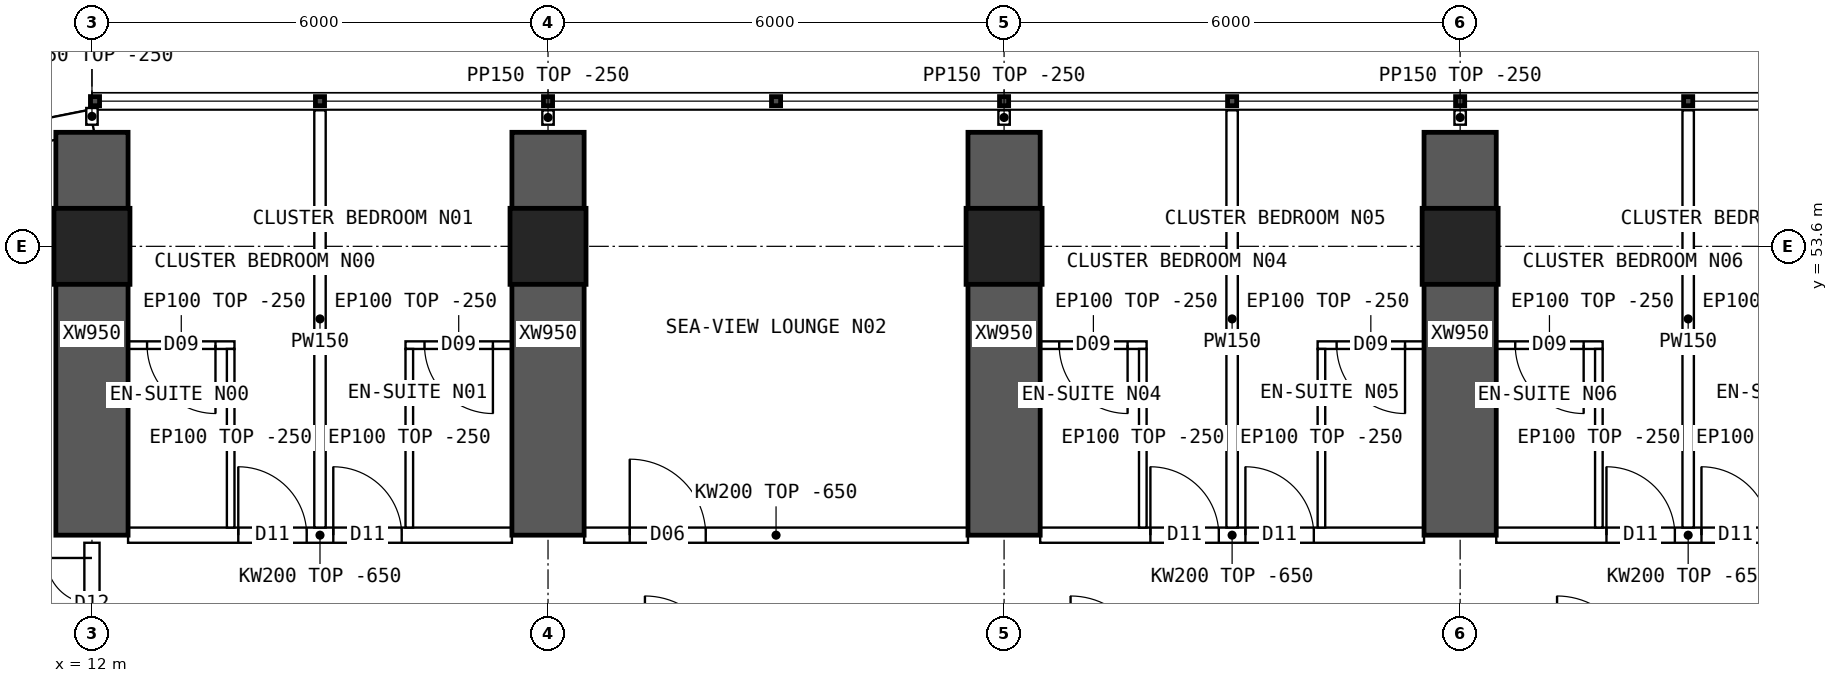
"""IFC4 building model, lengths in metres.
Left out: names, types, materials, properties, quantities, classifications, styles, units other than length and angle.
Written with IfcOpenShell. Run it as: python <this file> out.ifc"""

import sys

from ifc_helpers import new_model, si_unit, direction, frame, frame_2d, origin, origin_2d, place, context, subcontext, project, spatial, polyline, rectangle, hollow_rectangle, outline, extrude, element, fill, save


model = new_model("IFC4")
c1 = context("Model", 3, precision=1e-05, world=origin(), true_north=direction((0.0, 1.0)))
c2 = subcontext(c1, "Body", "Model", "MODEL_VIEW")
j1 = project(units=[si_unit("LENGTHUNIT", "METRE"), si_unit("PLANEANGLEUNIT", "RADIAN")], contexts=[c1])
p1 = place(None, origin())
s1 = spatial("IfcSite", under=j1, at=p1, CompositionType="ELEMENT")
p2 = place(p1, origin())
s2 = spatial("IfcBuilding", under=s1, at=p2, CompositionType="ELEMENT")
p3 = place(p2, frame((0.0, 0.0, 84.4)))
s3 = spatial("IfcBuildingStorey", under=s2, at=p3, CompositionType="ELEMENT", Elevation=84.4)
for number, where, z_axis, x_axis in (
    (1, (12.0, 53.6, 0.0), (0.0, 0.0, 1.0), (1.0, 0.0, 0.0)),
    (2, (18.0, 53.6, 0.0), (0.0, 0.0, 1.0), (1.0, 0.0, 0.0)),
    (3, (24.0, 53.6, 0.0), (0.0, 0.0, 1.0), (1.0, 0.0, 0.0)),
    (4, (30.0, 53.6, 0.0), (0.0, 0.0, 1.0), (1.0, 0.0, 0.0)),
):
    element("IfcColumn", number, at=place(p3, frame(where, z_axis=z_axis, x_axis=x_axis)), inside=s3, PredefinedType="COLUMN", context=c2, shape_type="SweptSolid", body=[
        extrude(hollow_rectangle(XDim=1.0, YDim=1.0, WallThickness=0.1, at=origin_2d()), origin(), (0.0, 0.0, 1.0), 3.75),
    ])
for number, where, z_axis, x_axis in (
    (5, (12.0, 49.8, 0.0), (0.0, 0.0, 1.0), (0.0, 1.0, 0.0)),
    (6, (18.0, 49.8, 0.0), (0.0, 0.0, 1.0), (0.0, 1.0, 0.0)),
    (7, (24.0, 49.8, 0.0), (0.0, 0.0, 1.0), (0.0, 1.0, 0.0)),
    (8, (30.0, 49.8, 0.0), (0.0, 0.0, 1.0), (0.0, 1.0, 0.0)),
):
    element("IfcWall", number, at=place(p3, frame(where, z_axis=z_axis, x_axis=x_axis)), inside=s3, PredefinedType="SHEAR", context=c2, shape_type="SweptSolid", body=[
        extrude(rectangle(XDim=5.3, YDim=0.95, at=frame_2d((2.65, 0.0))), origin(), (0.0, 0.0, 1.0), 3.75),
    ])
p4 = place(p3, frame((12.0, 55.25, 0.0), z_axis=(0.0, 0.0, 1.0), x_axis=(-0.980787251524, -0.195080412259, 0.0)))
e9 = element("IfcWall", 9, at=p4, inside=s3, PredefinedType="SOLIDWALL", context=c2, shape_type="SweptSolid", body=[
    extrude(outline(polyline([(-0.03, -0.15), (3.249, -0.15), (3.189, 0.15), (0.03, 0.15), (-0.03, -0.15)])), origin(), (0.0, 0.0, 1.0), 3.5),
])
p5 = place(p4, frame((0.909, 0.0, 0.9)))
e10 = element("IfcOpeningElement", 10, at=p5, cuts=e9, PredefinedType="OPENING", context=c2, shape_type="SweptSolid", body=[
    extrude(rectangle(XDim=1.4, YDim=1.8, at=frame_2d((0.7, 0.9))), frame((0.0, 0.16, 0.0), z_axis=(0.0, -1.0, 0.0), x_axis=(1.0, 0.0, 0.0)), (0.0, 0.0, 1.0), 0.32),
])
p6 = place(p3, frame((12.475, 49.8, 0.0), z_axis=(0.0, 0.0, 1.0), x_axis=(1.0, 0.0, 0.0)))
e11 = element("IfcWall", 11, at=p6, inside=s3, PredefinedType="SOLIDWALL", context=c2, shape_type="SweptSolid", body=[
    extrude(outline(polyline([(0.0, 0.0), (5.05, 0.0), (5.05, 3.1), (0.0, 3.1), (0.0, 0.0)])), frame((0.0, 0.1, 0.0), z_axis=(0.0, -1.0, 0.0), x_axis=(1.0, 0.0, 0.0)), (0.0, 0.0, 1.0), 0.2),
])
p7 = place(p6, frame((1.45, 0.0, 0.0)))
e12 = element("IfcOpeningElement", 12, at=p7, cuts=e11, PredefinedType="OPENING", context=c2, shape_type="SweptSolid", body=[
    extrude(rectangle(XDim=0.9, YDim=2.1, at=frame_2d((0.45, 1.05))), frame((0.0, 0.11, 0.0), z_axis=(0.0, -1.0, 0.0), x_axis=(1.0, 0.0, 0.0)), (0.0, 0.0, 1.0), 0.22),
])
p8 = place(p6, frame((2.7, 0.0, 0.0)))
e13 = element("IfcOpeningElement", 13, at=p8, cuts=e11, PredefinedType="OPENING", context=c2, shape_type="SweptSolid", body=[
    extrude(rectangle(XDim=0.9, YDim=2.1, at=frame_2d((0.45, 1.05))), frame((0.0, 0.11, 0.0), z_axis=(0.0, -1.0, 0.0), x_axis=(1.0, 0.0, 0.0)), (0.0, 0.0, 1.0), 0.22),
])
p9 = place(p3, frame((18.475, 49.8, 0.0), z_axis=(0.0, 0.0, 1.0), x_axis=(1.0, 0.0, 0.0)))
e14 = element("IfcWall", 14, at=p9, inside=s3, PredefinedType="SOLIDWALL", context=c2, shape_type="SweptSolid", body=[
    extrude(outline(polyline([(0.0, 0.0), (5.05, 0.0), (5.05, 3.1), (0.0, 3.1), (0.0, 0.0)])), frame((0.0, 0.1, 0.0), z_axis=(0.0, -1.0, 0.0), x_axis=(1.0, 0.0, 0.0)), (0.0, 0.0, 1.0), 0.2),
])
p10 = place(p9, frame((0.6, 0.0, 0.0)))
e15 = element("IfcOpeningElement", 15, at=p10, cuts=e14, PredefinedType="OPENING", context=c2, shape_type="SweptSolid", body=[
    extrude(rectangle(XDim=1.0, YDim=2.1, at=frame_2d((0.5, 1.05))), frame((0.0, 0.11, 0.0), z_axis=(0.0, -1.0, 0.0), x_axis=(1.0, 0.0, 0.0)), (0.0, 0.0, 1.0), 0.22),
])
p11 = place(p3, frame((24.475, 49.8, 0.0), z_axis=(0.0, 0.0, 1.0), x_axis=(1.0, 0.0, 0.0)))
e16 = element("IfcWall", 16, at=p11, inside=s3, PredefinedType="SOLIDWALL", context=c2, shape_type="SweptSolid", body=[
    extrude(outline(polyline([(0.0, 0.0), (5.05, 0.0), (5.05, 3.1), (0.0, 3.1), (0.0, 0.0)])), frame((0.0, 0.1, 0.0), z_axis=(0.0, -1.0, 0.0), x_axis=(1.0, 0.0, 0.0)), (0.0, 0.0, 1.0), 0.2),
])
p12 = place(p11, frame((1.45, 0.0, 0.0)))
e17 = element("IfcOpeningElement", 17, at=p12, cuts=e16, PredefinedType="OPENING", context=c2, shape_type="SweptSolid", body=[
    extrude(rectangle(XDim=0.9, YDim=2.1, at=frame_2d((0.45, 1.05))), frame((0.0, 0.11, 0.0), z_axis=(0.0, -1.0, 0.0), x_axis=(1.0, 0.0, 0.0)), (0.0, 0.0, 1.0), 0.22),
])
p13 = place(p11, frame((2.7, 0.0, 0.0)))
e18 = element("IfcOpeningElement", 18, at=p13, cuts=e16, PredefinedType="OPENING", context=c2, shape_type="SweptSolid", body=[
    extrude(rectangle(XDim=0.9, YDim=2.1, at=frame_2d((0.45, 1.05))), frame((0.0, 0.11, 0.0), z_axis=(0.0, -1.0, 0.0), x_axis=(1.0, 0.0, 0.0)), (0.0, 0.0, 1.0), 0.22),
])
p14 = place(p3, frame((30.475, 49.8, 0.0), z_axis=(0.0, 0.0, 1.0), x_axis=(1.0, 0.0, 0.0)))
e19 = element("IfcWall", 19, at=p14, inside=s3, PredefinedType="SOLIDWALL", context=c2, shape_type="SweptSolid", body=[
    extrude(outline(polyline([(0.0, 0.0), (5.05, 0.0), (5.05, 3.1), (0.0, 3.1), (0.0, 0.0)])), frame((0.0, 0.1, 0.0), z_axis=(0.0, -1.0, 0.0), x_axis=(1.0, 0.0, 0.0)), (0.0, 0.0, 1.0), 0.2),
])
p15 = place(p14, frame((1.45, 0.0, 0.0)))
e20 = element("IfcOpeningElement", 20, at=p15, cuts=e19, PredefinedType="OPENING", context=c2, shape_type="SweptSolid", body=[
    extrude(rectangle(XDim=0.9, YDim=2.1, at=frame_2d((0.45, 1.05))), frame((0.0, 0.11, 0.0), z_axis=(0.0, -1.0, 0.0), x_axis=(1.0, 0.0, 0.0)), (0.0, 0.0, 1.0), 0.22),
])
p16 = place(p14, frame((2.7, 0.0, 0.0)))
e21 = element("IfcOpeningElement", 21, at=p16, cuts=e19, PredefinedType="OPENING", context=c2, shape_type="SweptSolid", body=[
    extrude(rectangle(XDim=0.9, YDim=2.1, at=frame_2d((0.45, 1.05))), frame((0.0, 0.11, 0.0), z_axis=(0.0, -1.0, 0.0), x_axis=(1.0, 0.0, 0.0)), (0.0, 0.0, 1.0), 0.22),
])
p17 = place(p3, frame((15.0, 55.39, 0.0), z_axis=(0.0, 0.0, 1.0), x_axis=(0.0, -1.0, 0.0)))
e22 = element("IfcWall", 22, at=p17, inside=s3, PredefinedType="PARTITIONING", context=c2, shape_type="SweptSolid", body=[
    extrude(outline(polyline([(0.0, 0.0), (5.49, 0.0), (5.49, 3.1), (5.442, 3.1), (5.44, 3.5), (1.992, 3.5), (1.99, 3.1), (1.592, 3.1), (1.59, 3.5), (0.0, 3.5), (0.0, 0.0)])), frame((0.0, 0.075, 0.0), z_axis=(0.0, -1.0, 0.0), x_axis=(1.0, 0.0, 0.0)), (0.0, 0.0, 1.0), 0.15),
])
p18 = place(p3, frame((12.475, 52.3, 0.0), z_axis=(0.0, 0.0, 1.0), x_axis=(1.0, 0.0, 0.0)))
e23 = element("IfcWall", 23, at=p18, inside=s3, PredefinedType="PARTITIONING", context=c2, shape_type="SweptSolid", body=[
    extrude(rectangle(XDim=1.4, YDim=0.1, at=frame_2d((0.7, 0.0))), origin(), (0.0, 0.0, 1.0), 3.5),
])
p19 = place(p18, frame((0.25, 0.0, 0.0)))
e24 = element("IfcOpeningElement", 24, at=p19, cuts=e23, PredefinedType="OPENING", context=c2, shape_type="SweptSolid", body=[
    extrude(rectangle(XDim=0.9, YDim=2.1, at=frame_2d((0.45, 1.05))), frame((0.0, 0.06, 0.0), z_axis=(0.0, -1.0, 0.0), x_axis=(1.0, 0.0, 0.0)), (0.0, 0.0, 1.0), 0.12),
])
p20 = place(p3, frame((13.825, 52.25, 0.0), z_axis=(0.0, 0.0, 1.0), x_axis=(0.0, -1.0, 0.0)))
e25 = element("IfcWall", 25, at=p20, inside=s3, PredefinedType="PARTITIONING", context=c2, shape_type="SweptSolid", body=[
    extrude(outline(polyline([(0.0, 0.0), (2.35, 0.0), (2.35, 3.1), (2.302, 3.1), (2.3, 3.5), (0.0, 3.5), (0.0, 0.0)])), frame((0.0, 0.05, 0.0), z_axis=(0.0, -1.0, 0.0), x_axis=(1.0, 0.0, 0.0)), (0.0, 0.0, 1.0), 0.1),
])
p21 = place(p3, frame((16.125, 52.3, 0.0), z_axis=(0.0, 0.0, 1.0), x_axis=(1.0, 0.0, 0.0)))
e26 = element("IfcWall", 26, at=p21, inside=s3, PredefinedType="PARTITIONING", context=c2, shape_type="SweptSolid", body=[
    extrude(rectangle(XDim=1.4, YDim=0.1, at=frame_2d((0.7, 0.0))), origin(), (0.0, 0.0, 1.0), 3.5),
])
p22 = place(p21, frame((0.25, 0.0, 0.0)))
e27 = element("IfcOpeningElement", 27, at=p22, cuts=e26, PredefinedType="OPENING", context=c2, shape_type="SweptSolid", body=[
    extrude(rectangle(XDim=0.9, YDim=2.1, at=frame_2d((0.45, 1.05))), frame((0.0, 0.06, 0.0), z_axis=(0.0, -1.0, 0.0), x_axis=(1.0, 0.0, 0.0)), (0.0, 0.0, 1.0), 0.12),
])
p23 = place(p3, frame((16.175, 52.25, 0.0), z_axis=(0.0, 0.0, 1.0), x_axis=(0.0, -1.0, 0.0)))
e28 = element("IfcWall", 28, at=p23, inside=s3, PredefinedType="PARTITIONING", context=c2, shape_type="SweptSolid", body=[
    extrude(outline(polyline([(0.0, 0.0), (2.35, 0.0), (2.35, 3.1), (2.302, 3.1), (2.3, 3.5), (0.0, 3.5), (0.0, 0.0)])), frame((0.0, 0.05, 0.0), z_axis=(0.0, -1.0, 0.0), x_axis=(1.0, 0.0, 0.0)), (0.0, 0.0, 1.0), 0.1),
])
p24 = place(p3, frame((27.0, 55.39, 0.0), z_axis=(0.0, 0.0, 1.0), x_axis=(0.0, -1.0, 0.0)))
e29 = element("IfcWall", 29, at=p24, inside=s3, PredefinedType="PARTITIONING", context=c2, shape_type="SweptSolid", body=[
    extrude(outline(polyline([(0.0, 0.0), (5.49, 0.0), (5.49, 3.1), (5.442, 3.1), (5.44, 3.5), (1.992, 3.5), (1.99, 3.1), (1.592, 3.1), (1.59, 3.5), (0.0, 3.5), (0.0, 0.0)])), frame((0.0, 0.075, 0.0), z_axis=(0.0, -1.0, 0.0), x_axis=(1.0, 0.0, 0.0)), (0.0, 0.0, 1.0), 0.15),
])
p25 = place(p3, frame((24.475, 52.3, 0.0), z_axis=(0.0, 0.0, 1.0), x_axis=(1.0, 0.0, 0.0)))
e30 = element("IfcWall", 30, at=p25, inside=s3, PredefinedType="PARTITIONING", context=c2, shape_type="SweptSolid", body=[
    extrude(rectangle(XDim=1.4, YDim=0.1, at=frame_2d((0.7, 0.0))), origin(), (0.0, 0.0, 1.0), 3.5),
])
p26 = place(p25, frame((0.25, 0.0, 0.0)))
e31 = element("IfcOpeningElement", 31, at=p26, cuts=e30, PredefinedType="OPENING", context=c2, shape_type="SweptSolid", body=[
    extrude(rectangle(XDim=0.9, YDim=2.1, at=frame_2d((0.45, 1.05))), frame((0.0, 0.06, 0.0), z_axis=(0.0, -1.0, 0.0), x_axis=(1.0, 0.0, 0.0)), (0.0, 0.0, 1.0), 0.12),
])
p27 = place(p3, frame((25.825, 52.25, 0.0), z_axis=(0.0, 0.0, 1.0), x_axis=(0.0, -1.0, 0.0)))
e32 = element("IfcWall", 32, at=p27, inside=s3, PredefinedType="PARTITIONING", context=c2, shape_type="SweptSolid", body=[
    extrude(outline(polyline([(0.0, 0.0), (2.35, 0.0), (2.35, 3.1), (2.302, 3.1), (2.3, 3.5), (0.0, 3.5), (0.0, 0.0)])), frame((0.0, 0.05, 0.0), z_axis=(0.0, -1.0, 0.0), x_axis=(1.0, 0.0, 0.0)), (0.0, 0.0, 1.0), 0.1),
])
p28 = place(p3, frame((28.125, 52.3, 0.0), z_axis=(0.0, 0.0, 1.0), x_axis=(1.0, 0.0, 0.0)))
e33 = element("IfcWall", 33, at=p28, inside=s3, PredefinedType="PARTITIONING", context=c2, shape_type="SweptSolid", body=[
    extrude(rectangle(XDim=1.4, YDim=0.1, at=frame_2d((0.7, 0.0))), origin(), (0.0, 0.0, 1.0), 3.5),
])
p29 = place(p28, frame((0.25, 0.0, 0.0)))
e34 = element("IfcOpeningElement", 34, at=p29, cuts=e33, PredefinedType="OPENING", context=c2, shape_type="SweptSolid", body=[
    extrude(rectangle(XDim=0.9, YDim=2.1, at=frame_2d((0.45, 1.05))), frame((0.0, 0.06, 0.0), z_axis=(0.0, -1.0, 0.0), x_axis=(1.0, 0.0, 0.0)), (0.0, 0.0, 1.0), 0.12),
])
p30 = place(p3, frame((28.175, 52.25, 0.0), z_axis=(0.0, 0.0, 1.0), x_axis=(0.0, -1.0, 0.0)))
e35 = element("IfcWall", 35, at=p30, inside=s3, PredefinedType="PARTITIONING", context=c2, shape_type="SweptSolid", body=[
    extrude(outline(polyline([(0.0, 0.0), (2.35, 0.0), (2.35, 3.1), (2.302, 3.1), (2.3, 3.5), (0.0, 3.5), (0.0, 0.0)])), frame((0.0, 0.05, 0.0), z_axis=(0.0, -1.0, 0.0), x_axis=(1.0, 0.0, 0.0)), (0.0, 0.0, 1.0), 0.1),
])
p31 = place(p3, frame((33.0, 55.39, 0.0), z_axis=(0.0, 0.0, 1.0), x_axis=(0.0, -1.0, 0.0)))
e36 = element("IfcWall", 36, at=p31, inside=s3, PredefinedType="PARTITIONING", context=c2, shape_type="SweptSolid", body=[
    extrude(outline(polyline([(0.0, 0.0), (5.49, 0.0), (5.49, 3.1), (5.442, 3.1), (5.44, 3.5), (1.992, 3.5), (1.99, 3.1), (1.592, 3.1), (1.59, 3.5), (0.0, 3.5), (0.0, 0.0)])), frame((0.0, 0.075, 0.0), z_axis=(0.0, -1.0, 0.0), x_axis=(1.0, 0.0, 0.0)), (0.0, 0.0, 1.0), 0.15),
])
p32 = place(p3, frame((30.475, 52.3, 0.0), z_axis=(0.0, 0.0, 1.0), x_axis=(1.0, 0.0, 0.0)))
e37 = element("IfcWall", 37, at=p32, inside=s3, PredefinedType="PARTITIONING", context=c2, shape_type="SweptSolid", body=[
    extrude(rectangle(XDim=1.4, YDim=0.1, at=frame_2d((0.7, 0.0))), origin(), (0.0, 0.0, 1.0), 3.5),
])
p33 = place(p32, frame((0.25, 0.0, 0.0)))
e38 = element("IfcOpeningElement", 38, at=p33, cuts=e37, PredefinedType="OPENING", context=c2, shape_type="SweptSolid", body=[
    extrude(rectangle(XDim=0.9, YDim=2.1, at=frame_2d((0.45, 1.05))), frame((0.0, 0.06, 0.0), z_axis=(0.0, -1.0, 0.0), x_axis=(1.0, 0.0, 0.0)), (0.0, 0.0, 1.0), 0.12),
])
p34 = place(p3, frame((31.825, 52.25, 0.0), z_axis=(0.0, 0.0, 1.0), x_axis=(0.0, -1.0, 0.0)))
e39 = element("IfcWall", 39, at=p34, inside=s3, PredefinedType="PARTITIONING", context=c2, shape_type="SweptSolid", body=[
    extrude(outline(polyline([(0.0, 0.0), (2.35, 0.0), (2.35, 3.1), (2.302, 3.1), (2.3, 3.5), (0.0, 3.5), (0.0, 0.0)])), frame((0.0, 0.05, 0.0), z_axis=(0.0, -1.0, 0.0), x_axis=(1.0, 0.0, 0.0)), (0.0, 0.0, 1.0), 0.1),
])
p35 = place(p3, frame((12.0, 48.1, 0.0), z_axis=(0.0, 0.0, 1.0), x_axis=(0.0, 1.0, 0.0)))
e40 = element("IfcWall", 40, at=p35, inside=s3, PredefinedType="SOLIDWALL", context=c2, shape_type="SweptSolid", body=[
    extrude(outline(polyline([(0.0, 0.0), (1.6, 0.0), (1.6, 3.1), (0.0, 3.1), (0.0, 0.0)])), frame((0.0, 0.1, 0.0), z_axis=(0.0, -1.0, 0.0), x_axis=(1.0, 0.0, 0.0)), (0.0, 0.0, 1.0), 0.2),
])
p36 = place(p35, frame((0.2, 0.0, 0.0)))
e41 = element("IfcOpeningElement", 41, at=p36, cuts=e40, PredefinedType="OPENING", context=c2, shape_type="SweptSolid", body=[
    extrude(rectangle(XDim=1.2, YDim=2.1, at=frame_2d((0.6, 1.05))), frame((0.0, 0.11, 0.0), z_axis=(0.0, -1.0, 0.0), x_axis=(1.0, 0.0, 0.0)), (0.0, 0.0, 1.0), 0.22),
])
p37 = place(p3, frame((12.0, 55.2, 0.0), z_axis=(0.0, 0.0, 1.0), x_axis=(0.0, 1.0, 0.0)))
e42 = element("IfcWall", 42, at=p37, inside=s3, PredefinedType="PARTITIONING", context=c2, shape_type="SweptSolid", body=[
    extrude(rectangle(XDim=0.22, YDim=0.15, at=frame_2d((0.11, 0.0))), origin(), (0.0, 0.0, 1.0), 3.5),
])
for number, where, z_axis, x_axis in (
    (43, (18.0, 55.2, 0.0), (0.0, 0.0, 1.0), (0.0, 1.0, 0.0)),
    (44, (24.0, 55.2, 0.0), (0.0, 0.0, 1.0), (0.0, 1.0, 0.0)),
    (45, (30.0, 55.2, 0.0), (0.0, 0.0, 1.0), (0.0, 1.0, 0.0)),
):
    element("IfcWall", number, at=place(p3, frame(where, z_axis=z_axis, x_axis=x_axis)), inside=s3, PredefinedType="PARTITIONING", context=c2, shape_type="SweptSolid", body=[
        extrude(rectangle(XDim=0.19, YDim=0.15, at=frame_2d((0.095, 0.0))), origin(), (0.0, 0.0, 1.0), 3.5),
    ])
p38 = place(p19, origin())
e46 = element("IfcDoor", 46, at=p38, inside=s3, OperationType="SINGLE_SWING_RIGHT", PredefinedType="DOOR", context=c2, shape_type="SweptSolid", body=[
    extrude(rectangle(XDim=0.9, YDim=2.1, at=frame_2d((0.45, 1.05))), frame((0.0, 0.025, 0.0), z_axis=(0.0, -1.0, 0.0), x_axis=(1.0, 0.0, 0.0)), (0.0, 0.0, 1.0), 0.05),
])
fill(e24, e46)
p39 = place(p7, origin())
e47 = element("IfcDoor", 47, at=p39, inside=s3, OperationType="SINGLE_SWING_LEFT", PredefinedType="DOOR", context=c2, shape_type="SweptSolid", body=[
    extrude(rectangle(XDim=0.9, YDim=2.1, at=frame_2d((0.45, 1.05))), frame((0.0, 0.025, 0.0), z_axis=(0.0, -1.0, 0.0), x_axis=(1.0, 0.0, 0.0)), (0.0, 0.0, 1.0), 0.05),
])
fill(e12, e47)
p40 = place(p22, origin())
e48 = element("IfcDoor", 48, at=p40, inside=s3, OperationType="SINGLE_SWING_RIGHT", PredefinedType="DOOR", context=c2, shape_type="SweptSolid", body=[
    extrude(rectangle(XDim=0.9, YDim=2.1, at=frame_2d((0.45, 1.05))), frame((0.0, 0.025, 0.0), z_axis=(0.0, -1.0, 0.0), x_axis=(1.0, 0.0, 0.0)), (0.0, 0.0, 1.0), 0.05),
])
fill(e27, e48)
p41 = place(p8, origin())
e49 = element("IfcDoor", 49, at=p41, inside=s3, OperationType="SINGLE_SWING_LEFT", PredefinedType="DOOR", context=c2, shape_type="SweptSolid", body=[
    extrude(rectangle(XDim=0.9, YDim=2.1, at=frame_2d((0.45, 1.05))), frame((0.0, 0.025, 0.0), z_axis=(0.0, -1.0, 0.0), x_axis=(1.0, 0.0, 0.0)), (0.0, 0.0, 1.0), 0.05),
])
fill(e13, e49)
p42 = place(p10, origin())
e50 = element("IfcDoor", 50, at=p42, inside=s3, OperationType="SINGLE_SWING_LEFT", PredefinedType="DOOR", context=c2, shape_type="SweptSolid", body=[
    extrude(rectangle(XDim=1.0, YDim=2.1, at=frame_2d((0.5, 1.05))), frame((0.0, 0.025, 0.0), z_axis=(0.0, -1.0, 0.0), x_axis=(1.0, 0.0, 0.0)), (0.0, 0.0, 1.0), 0.05),
])
fill(e15, e50)
p43 = place(p26, origin())
e51 = element("IfcDoor", 51, at=p43, inside=s3, OperationType="SINGLE_SWING_RIGHT", PredefinedType="DOOR", context=c2, shape_type="SweptSolid", body=[
    extrude(rectangle(XDim=0.9, YDim=2.1, at=frame_2d((0.45, 1.05))), frame((0.0, 0.025, 0.0), z_axis=(0.0, -1.0, 0.0), x_axis=(1.0, 0.0, 0.0)), (0.0, 0.0, 1.0), 0.05),
])
fill(e31, e51)
p44 = place(p12, origin())
e52 = element("IfcDoor", 52, at=p44, inside=s3, OperationType="SINGLE_SWING_LEFT", PredefinedType="DOOR", context=c2, shape_type="SweptSolid", body=[
    extrude(rectangle(XDim=0.9, YDim=2.1, at=frame_2d((0.45, 1.05))), frame((0.0, 0.025, 0.0), z_axis=(0.0, -1.0, 0.0), x_axis=(1.0, 0.0, 0.0)), (0.0, 0.0, 1.0), 0.05),
])
fill(e17, e52)
p45 = place(p29, origin())
e53 = element("IfcDoor", 53, at=p45, inside=s3, OperationType="SINGLE_SWING_RIGHT", PredefinedType="DOOR", context=c2, shape_type="SweptSolid", body=[
    extrude(rectangle(XDim=0.9, YDim=2.1, at=frame_2d((0.45, 1.05))), frame((0.0, 0.025, 0.0), z_axis=(0.0, -1.0, 0.0), x_axis=(1.0, 0.0, 0.0)), (0.0, 0.0, 1.0), 0.05),
])
fill(e34, e53)
p46 = place(p13, origin())
e54 = element("IfcDoor", 54, at=p46, inside=s3, OperationType="SINGLE_SWING_LEFT", PredefinedType="DOOR", context=c2, shape_type="SweptSolid", body=[
    extrude(rectangle(XDim=0.9, YDim=2.1, at=frame_2d((0.45, 1.05))), frame((0.0, 0.025, 0.0), z_axis=(0.0, -1.0, 0.0), x_axis=(1.0, 0.0, 0.0)), (0.0, 0.0, 1.0), 0.05),
])
fill(e18, e54)
p47 = place(p33, origin())
e55 = element("IfcDoor", 55, at=p47, inside=s3, OperationType="SINGLE_SWING_RIGHT", PredefinedType="DOOR", context=c2, shape_type="SweptSolid", body=[
    extrude(rectangle(XDim=0.9, YDim=2.1, at=frame_2d((0.45, 1.05))), frame((0.0, 0.025, 0.0), z_axis=(0.0, -1.0, 0.0), x_axis=(1.0, 0.0, 0.0)), (0.0, 0.0, 1.0), 0.05),
])
fill(e38, e55)
p48 = place(p15, origin())
e56 = element("IfcDoor", 56, at=p48, inside=s3, OperationType="SINGLE_SWING_LEFT", PredefinedType="DOOR", context=c2, shape_type="SweptSolid", body=[
    extrude(rectangle(XDim=0.9, YDim=2.1, at=frame_2d((0.45, 1.05))), frame((0.0, 0.025, 0.0), z_axis=(0.0, -1.0, 0.0), x_axis=(1.0, 0.0, 0.0)), (0.0, 0.0, 1.0), 0.05),
])
fill(e20, e56)
p49 = place(p16, origin())
e57 = element("IfcDoor", 57, at=p49, inside=s3, OperationType="SINGLE_SWING_LEFT", PredefinedType="DOOR", context=c2, shape_type="SweptSolid", body=[
    extrude(rectangle(XDim=0.9, YDim=2.1, at=frame_2d((0.45, 1.05))), frame((0.0, 0.025, 0.0), z_axis=(0.0, -1.0, 0.0), x_axis=(1.0, 0.0, 0.0)), (0.0, 0.0, 1.0), 0.05),
])
fill(e21, e57)
p50 = place(p36, origin())
e58 = element("IfcDoor", 58, at=p50, inside=s3, OperationType="DOUBLE_DOOR_SINGLE_SWING", PredefinedType="DOOR", context=c2, shape_type="SweptSolid", body=[
    extrude(rectangle(XDim=1.2, YDim=2.1, at=frame_2d((0.6, 1.05))), frame((0.0, 0.025, 0.0), z_axis=(0.0, -1.0, 0.0), x_axis=(1.0, 0.0, 0.0)), (0.0, 0.0, 1.0), 0.05),
])
fill(e41, e58)
save(model, sys.argv[1])
